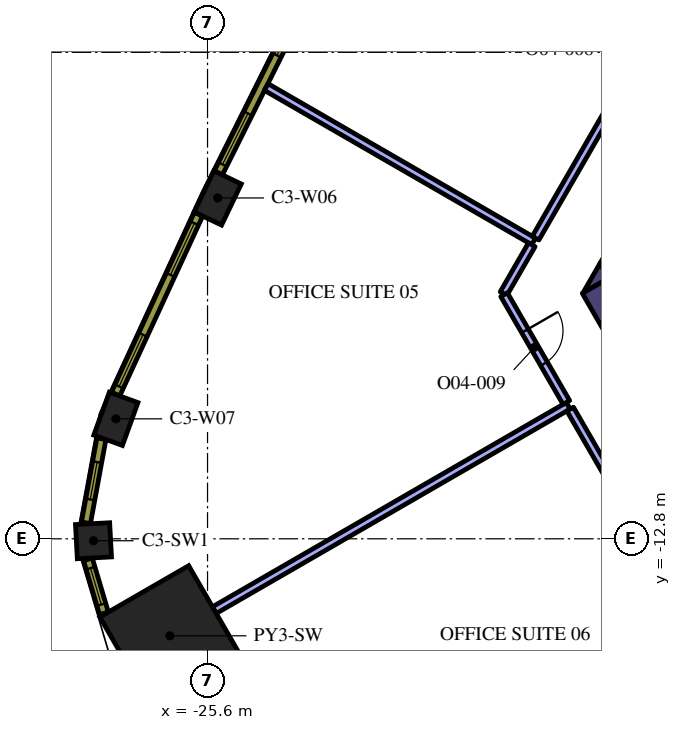
"""IFC4 building model, lengths in metres.
Left out: names, types, materials, properties, quantities, classifications, styles, units other than length and angle.
Written with IfcOpenShell. Run it as: python <this file> out.ifc"""

import sys

from ifc_helpers import new_model, si_unit, direction, frame, frame_2d, origin, origin_2d, place, context, subcontext, project, spatial, polyline, rectangle, outline, extrude, element, fill, save


model = new_model("IFC4")
c1 = context("Model", 3, precision=1e-05, world=origin(), true_north=direction((0.0, 1.0)))
c2 = subcontext(c1, "Body", "Model", "MODEL_VIEW")
j1 = project(units=[si_unit("LENGTHUNIT", "METRE"), si_unit("PLANEANGLEUNIT", "RADIAN")], contexts=[c1])
p1 = place(None, origin())
s1 = spatial("IfcSite", under=j1, at=p1, CompositionType="ELEMENT")
p2 = place(p1, origin())
s2 = spatial("IfcBuilding", under=s1, at=p2, CompositionType="ELEMENT")
p3 = place(p2, frame((0.0, 0.0, 179.4)))
s3 = spatial("IfcBuildingStorey", under=s2, at=p3, CompositionType="ELEMENT", Elevation=179.4)
p4 = place(p3, frame((-26.591, -15.352, 0.0), z_axis=(0.0, 0.0, 1.0), x_axis=(-0.866025403784, -0.5, 0.0)))
e1 = element("IfcColumn", 1, at=p4, inside=s3, PredefinedType="COLUMN", context=c2, shape_type="SweptSolid", body=[
    extrude(rectangle(XDim=2.7, YDim=2.7, at=origin_2d()), origin(), (0.0, 0.0, 1.0), 4.2),
])
for number, where, z_axis, x_axis in (
    (2, (-25.332, -3.832, 0.0), (0.0, 0.0, 1.0), (-0.433, -0.902, 0.0)),
    (3, (-28.012, -9.644, 0.0), (0.0, 0.0, 1.0), (-0.341, -0.94, 0.0)),
):
    element("IfcColumn", number, at=place(p3, frame(where, z_axis=z_axis, x_axis=x_axis)), inside=s3, PredefinedType="COLUMN", context=c2, shape_type="SweptSolid", body=[
        extrude(rectangle(XDim=1.2, YDim=0.8, at=origin_2d()), origin(), (0.0, 0.0, 1.0), 4.2),
    ])
p5 = place(p3, frame((-28.601, -12.851, 0.0), z_axis=(0.0, 0.0, 1.0), x_axis=(0.0533921468, -0.998573622053, 0.0)))
e4 = element("IfcColumn", 4, at=p5, inside=s3, PredefinedType="COLUMN", context=c2, shape_type="SweptSolid", body=[
    extrude(rectangle(XDim=0.9, YDim=0.9, at=origin_2d()), origin(), (0.0, 0.0, 1.0), 4.2),
])
p6 = place(p3, frame((-15.392, -6.14, 0.0), z_axis=(0.0, 0.0, 1.0), x_axis=(0.499984020225, -0.866034629516, 0.0)))
e5 = element("IfcWall", 5, at=p6, inside=s3, PredefinedType="SOLIDWALL", context=c2, shape_type="SweptSolid", body=[
    extrude(rectangle(XDim=3.824, YDim=0.8, at=frame_2d((1.912, 0.0))), origin(), (0.0, 0.0, 1.0), 4.2),
])
p7 = place(p3, origin())
e6 = element("IfcWall", 6, at=p7, inside=s3, PredefinedType="SOLIDWALL", context=c2, shape_type="SweptSolid", body=[
    extrude(outline(polyline([(-15.047, -5.938), (-15.719, -6.326), (-15.271, -5.55), (-15.047, -5.938)])), origin(), (0.0, 0.0, 1.0), 4.2),
])
p8 = place(p3, frame((-13.518, -3.314, 0.0), z_axis=(0.0, 0.0, 1.0), x_axis=(-0.499969377405, -0.866043083026, 0.0)))
e7 = element("IfcWall", 7, at=p8, inside=s3, PredefinedType="SOLIDWALL", context=c2, shape_type="SweptSolid", body=[
    extrude(rectangle(XDim=2.824, YDim=0.8, at=frame_2d((1.412, 0.0))), origin(), (0.0, 0.0, 1.0), 4.2),
])
e8 = element("IfcWall", 8, at=p7, inside=s3, PredefinedType="SOLIDWALL", context=c2, shape_type="SweptSolid", body=[
    extrude(outline(polyline([(-14.809, -6.35), (-15.257, -5.574), (-14.585, -5.962), (-14.809, -6.35)])), origin(), (0.0, 0.0, 1.0), 4.2),
])
p9 = place(p3, frame((-17.018, -4.976, 0.0), z_axis=(0.0, 0.0, 1.0), x_axis=(-0.866034495264, 0.499984252764, 0.0)))
e9 = element("IfcWall", 9, at=p9, inside=s3, PredefinedType="PARTITIONING", context=c2, shape_type="SweptSolid", body=[
    extrude(rectangle(XDim=8.126, YDim=0.2, at=frame_2d((4.063, 0.0))), origin(), (0.0, 0.0, 1.0), 3.15),
])
p10 = place(p3, frame((-12.374, 3.068, 0.0), z_axis=(0.0, 0.0, 1.0), x_axis=(-0.50000000053, -0.866025403479, 0.0)))
e10 = element("IfcWall", 10, at=p10, inside=s3, PredefinedType="PARTITIONING", context=c2, shape_type="SweptSolid", body=[
    extrude(rectangle(XDim=9.188, YDim=0.2, at=frame_2d((4.594, 0.0))), origin(), (0.0, 0.0, 1.0), 3.15),
])
p11 = place(p10, frame((4.1, 0.0, 0.0)))
e11 = element("IfcOpeningElement", 11, at=p11, cuts=e10, PredefinedType="OPENING", context=c2, shape_type="SweptSolid", body=[
    extrude(rectangle(XDim=1.0, YDim=2.1, at=frame_2d((0.5, 1.05))), frame((0.0, 0.11, 0.0), z_axis=(0.0, -1.0, 0.0), x_axis=(1.0, 0.0, 0.0)), (0.0, 0.0, 1.0), 0.22),
])
p12 = place(p3, frame((-16.108, -9.3, 0.0), z_axis=(0.0, 0.0, 1.0), x_axis=(-0.866027180319, -0.499996922939, 0.0)))
e12 = element("IfcWall", 12, at=p12, inside=s3, PredefinedType="PARTITIONING", context=c2, shape_type="SweptSolid", body=[
    extrude(rectangle(XDim=10.754, YDim=0.2, at=frame_2d((5.377, 0.0))), origin(), (0.0, 0.0, 1.0), 3.15),
])
p13 = place(p3, frame((-17.068, -5.062, 0.0), z_axis=(0.0, 0.0, 1.0), x_axis=(-0.499935638681, -0.86606255962, 0.0)))
e13 = element("IfcWall", 13, at=p13, inside=s3, PredefinedType="PARTITIONING", context=c2, shape_type="SweptSolid", body=[
    extrude(rectangle(XDim=1.487, YDim=0.2, at=frame_2d((0.744, 0.0))), origin(), (0.0, 0.0, 1.0), 3.15),
])
p14 = place(p3, frame((-17.796, -6.376, 0.0), z_axis=(0.0, 0.0, 1.0), x_axis=(0.500001965626, -0.866024268927, 0.0)))
e14 = element("IfcWall", 14, at=p14, inside=s3, PredefinedType="PARTITIONING", context=c2, shape_type="SweptSolid", body=[
    extrude(rectangle(XDim=3.276, YDim=0.2, at=frame_2d((1.638, 0.0))), origin(), (0.0, 0.0, 1.0), 3.15),
])
p15 = place(p14, frame((1.1, 0.0, 0.0)))
e15 = element("IfcOpeningElement", 15, at=p15, cuts=e14, PredefinedType="OPENING", context=c2, shape_type="SweptSolid", body=[
    extrude(rectangle(XDim=1.0, YDim=2.1, at=frame_2d((0.5, 1.05))), frame((0.0, 0.11, 0.0), z_axis=(0.0, -1.0, 0.0), x_axis=(1.0, 0.0, 0.0)), (0.0, 0.0, 1.0), 0.22),
])
p16 = place(p3, frame((-16.058, -9.387, 0.0), z_axis=(0.0, 0.0, 1.0), x_axis=(0.500046299512, -0.865998671098, 0.0)))
e16 = element("IfcWall", 16, at=p16, inside=s3, PredefinedType="PARTITIONING", context=c2, shape_type="SweptSolid", body=[
    extrude(rectangle(XDim=3.306, YDim=0.2, at=frame_2d((1.653, 0.0))), origin(), (0.0, 0.0, 1.0), 3.15),
])
p17 = place(p3, frame((-22.994, 1.485, 0.0), z_axis=(0.0, 0.0, 1.0), x_axis=(-0.446256171312, -0.8949052629, 0.0)))
e17 = element("IfcWall", 17, at=p17, inside=s3, PredefinedType="SOLIDWALL", context=c2, shape_type="SweptSolid", body=[
    extrude(rectangle(XDim=5.203, YDim=0.24, at=frame_2d((2.602, 0.0))), origin(), (0.0, 0.0, 1.0), 3.95),
])
p18 = place(p17, frame((0.248, 0.0, 0.9)))
e18 = element("IfcOpeningElement", 18, at=p18, cuts=e17, PredefinedType="OPENING", context=c2, shape_type="SweptSolid", body=[
    extrude(rectangle(XDim=1.5, YDim=2.55, at=frame_2d((0.75, 1.275))), frame((0.0, 0.13, 0.0), z_axis=(0.0, -1.0, 0.0), x_axis=(1.0, 0.0, 0.0)), (0.0, 0.0, 1.0), 0.26),
])
p19 = place(p17, frame((3.455, 0.0, 0.9)))
e19 = element("IfcOpeningElement", 19, at=p19, cuts=e17, PredefinedType="OPENING", context=c2, shape_type="SweptSolid", body=[
    extrude(rectangle(XDim=1.5, YDim=2.55, at=frame_2d((0.75, 1.275))), frame((0.0, 0.13, 0.0), z_axis=(0.0, -1.0, 0.0), x_axis=(1.0, 0.0, 0.0)), (0.0, 0.0, 1.0), 0.26),
])
p20 = place(p3, frame((-25.837, -4.258, 0.0), z_axis=(0.0, 0.0, 1.0), x_axis=(-0.418722559465, -0.908114209885, 0.0)))
e20 = element("IfcWall", 20, at=p20, inside=s3, PredefinedType="SOLIDWALL", context=c2, shape_type="SweptSolid", body=[
    extrude(rectangle(XDim=5.213, YDim=0.24, at=frame_2d((2.606, 0.0))), origin(), (0.0, 0.0, 1.0), 3.95),
])
p21 = place(p20, frame((0.261, 0.0, 0.9)))
e21 = element("IfcOpeningElement", 21, at=p21, cuts=e20, PredefinedType="OPENING", context=c2, shape_type="SweptSolid", body=[
    extrude(rectangle(XDim=1.5, YDim=2.55, at=frame_2d((0.75, 1.275))), frame((0.0, 0.13, 0.0), z_axis=(0.0, -1.0, 0.0), x_axis=(1.0, 0.0, 0.0)), (0.0, 0.0, 1.0), 0.26),
])
p22 = place(p20, frame((3.492, 0.0, 0.9)))
e22 = element("IfcOpeningElement", 22, at=p22, cuts=e20, PredefinedType="OPENING", context=c2, shape_type="SweptSolid", body=[
    extrude(rectangle(XDim=1.5, YDim=2.55, at=frame_2d((0.75, 1.275))), frame((0.0, 0.13, 0.0), z_axis=(0.0, -1.0, 0.0), x_axis=(1.0, 0.0, 0.0)), (0.0, 0.0, 1.0), 0.26),
])
p23 = place(p3, frame((-28.393, -10.167, 0.0), z_axis=(0.0, 0.0, 1.0), x_axis=(-0.180737189259, -0.983531427265, 0.0)))
e23 = element("IfcWall", 23, at=p23, inside=s3, PredefinedType="SOLIDWALL", context=c2, shape_type="SweptSolid", body=[
    extrude(rectangle(XDim=2.25, YDim=0.24, at=frame_2d((1.125, 0.0))), origin(), (0.0, 0.0, 1.0), 3.95),
])
p24 = place(p23, frame((0.625, 0.0, 0.9)))
e24 = element("IfcOpeningElement", 24, at=p24, cuts=e23, PredefinedType="OPENING", context=c2, shape_type="SweptSolid", body=[
    extrude(rectangle(XDim=1.0, YDim=2.55, at=frame_2d((0.5, 1.275))), frame((0.0, 0.13, 0.0), z_axis=(0.0, -1.0, 0.0), x_axis=(1.0, 0.0, 0.0)), (0.0, 0.0, 1.0), 0.26),
])
p25 = place(p3, frame((-28.748, -13.34, 0.0), z_axis=(0.0, 0.0, 1.0), x_axis=(0.284413721403, -0.958701640281, 0.0)))
e25 = element("IfcWall", 25, at=p25, inside=s3, PredefinedType="SOLIDWALL", context=c2, shape_type="SweptSolid", body=[
    extrude(rectangle(XDim=1.482, YDim=0.24, at=frame_2d((0.741, 0.0))), origin(), (0.0, 0.0, 1.0), 3.95),
])
p26 = place(p25, frame((0.241, 0.0, 0.9)))
e26 = element("IfcOpeningElement", 26, at=p26, cuts=e25, PredefinedType="OPENING", context=c2, shape_type="SweptSolid", body=[
    extrude(rectangle(XDim=1.0, YDim=2.55, at=frame_2d((0.5, 1.275))), frame((0.0, 0.13, 0.0), z_axis=(0.0, -1.0, 0.0), x_axis=(1.0, 0.0, 0.0)), (0.0, 0.0, 1.0), 0.26),
])
p27 = place(p15, origin())
e27 = element("IfcDoor", 27, at=p27, inside=s3, OperationType="SINGLE_SWING_LEFT", PredefinedType="DOOR", context=c2, shape_type="SweptSolid", body=[
    extrude(rectangle(XDim=1.0, YDim=2.1, at=frame_2d((0.5, 1.05))), frame((0.0, 0.025, 0.0), z_axis=(0.0, -1.0, 0.0), x_axis=(1.0, 0.0, 0.0)), (0.0, 0.0, 1.0), 0.05),
])
fill(e15, e27)
p28 = place(p18, origin())
e28 = element("IfcWindow", 28, at=p28, inside=s3, PartitioningType="SINGLE_PANEL", PredefinedType="WINDOW", context=c2, shape_type="SweptSolid", body=[
    extrude(rectangle(XDim=1.5, YDim=2.55, at=frame_2d((0.75, 1.275))), frame((0.0, 0.04, 0.0), z_axis=(0.0, -1.0, 0.0), x_axis=(1.0, 0.0, 0.0)), (0.0, 0.0, 1.0), 0.06),
])
fill(e18, e28)
p29 = place(p19, origin())
e29 = element("IfcWindow", 29, at=p29, inside=s3, PartitioningType="SINGLE_PANEL", PredefinedType="WINDOW", context=c2, shape_type="SweptSolid", body=[
    extrude(rectangle(XDim=1.5, YDim=2.55, at=frame_2d((0.75, 1.275))), frame((0.0, 0.04, 0.0), z_axis=(0.0, -1.0, 0.0), x_axis=(1.0, 0.0, 0.0)), (0.0, 0.0, 1.0), 0.06),
])
fill(e19, e29)
p30 = place(p21, origin())
e30 = element("IfcWindow", 30, at=p30, inside=s3, PartitioningType="SINGLE_PANEL", PredefinedType="WINDOW", context=c2, shape_type="SweptSolid", body=[
    extrude(rectangle(XDim=1.5, YDim=2.55, at=frame_2d((0.75, 1.275))), frame((0.0, 0.04, 0.0), z_axis=(0.0, -1.0, 0.0), x_axis=(1.0, 0.0, 0.0)), (0.0, 0.0, 1.0), 0.06),
])
fill(e21, e30)
p31 = place(p22, origin())
e31 = element("IfcWindow", 31, at=p31, inside=s3, PartitioningType="SINGLE_PANEL", PredefinedType="WINDOW", context=c2, shape_type="SweptSolid", body=[
    extrude(rectangle(XDim=1.5, YDim=2.55, at=frame_2d((0.75, 1.275))), frame((0.0, 0.04, 0.0), z_axis=(0.0, -1.0, 0.0), x_axis=(1.0, 0.0, 0.0)), (0.0, 0.0, 1.0), 0.06),
])
fill(e22, e31)
p32 = place(p24, origin())
e32 = element("IfcWindow", 32, at=p32, inside=s3, PartitioningType="SINGLE_PANEL", PredefinedType="WINDOW", context=c2, shape_type="SweptSolid", body=[
    extrude(rectangle(XDim=1.0, YDim=2.55, at=frame_2d((0.5, 1.275))), frame((0.0, 0.04, 0.0), z_axis=(0.0, -1.0, 0.0), x_axis=(1.0, 0.0, 0.0)), (0.0, 0.0, 1.0), 0.06),
])
fill(e24, e32)
p33 = place(p26, origin())
e33 = element("IfcWindow", 33, at=p33, inside=s3, PartitioningType="SINGLE_PANEL", PredefinedType="WINDOW", context=c2, shape_type="SweptSolid", body=[
    extrude(rectangle(XDim=1.0, YDim=2.55, at=frame_2d((0.5, 1.275))), frame((0.0, 0.04, 0.0), z_axis=(0.0, -1.0, 0.0), x_axis=(1.0, 0.0, 0.0)), (0.0, 0.0, 1.0), 0.06),
])
fill(e26, e33)
save(model, sys.argv[1])
